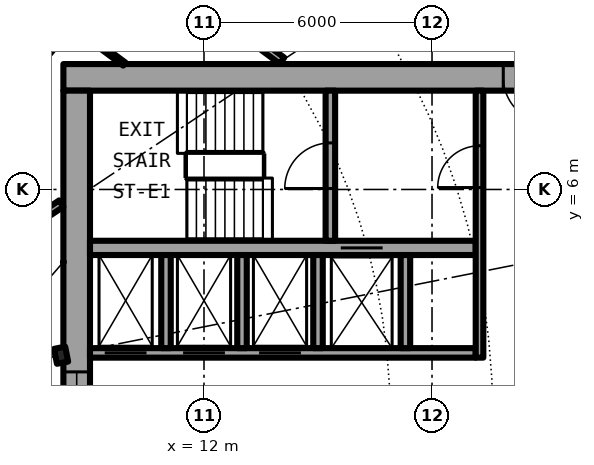
"""IFC4 building model, lengths in metres.
Left out: names, types, materials, properties, quantities, classifications, styles, units other than length and angle.
Written with IfcOpenShell. Run it as: python <this file> out.ifc"""

import sys

from ifc_helpers import new_model, si_unit, direction, frame, frame_2d, origin, origin_2d, place, context, subcontext, project, spatial, rectangle, i_section, extrude, element, fill, save


model = new_model("IFC4")
c1 = context("Model", 3, precision=1e-05, world=origin(), true_north=direction((0.0, 1.0)))
c2 = subcontext(c1, "Body", "Model", "MODEL_VIEW")
j1 = project(units=[si_unit("LENGTHUNIT", "METRE"), si_unit("PLANEANGLEUNIT", "RADIAN")], contexts=[c1])
p1 = place(None, origin())
s1 = spatial("IfcSite", under=j1, at=p1, CompositionType="ELEMENT")
p2 = place(p1, origin())
s2 = spatial("IfcBuilding", under=s1, at=p2, CompositionType="ELEMENT")
p3 = place(p2, frame((0.0, 0.0, 72.75)))
s3 = spatial("IfcBuildingStorey", under=s2, at=p3, CompositionType="ELEMENT", Elevation=72.75)
p4 = place(p3, frame((8.239, 1.639, 0.0), z_axis=(0.0, 0.0, 1.0), x_axis=(0.980785280403, 0.195090322016, 0.0)))
e1 = element("IfcColumn", 1, at=p4, inside=s3, PredefinedType="COLUMN", context=c2, shape_type="SweptSolid", body=[
    extrude(i_section(OverallWidth=0.3, OverallDepth=0.4, WebThickness=0.013, FlangeThickness=0.024, FilletRadius=0.027, at=origin_2d()), origin(), (0.0, 0.0, 1.0), 3.05),
])
p5 = place(p3, frame((22.3, 8.95, 0.0), z_axis=(0.0, 0.0, 1.0), x_axis=(-1.0, 0.0, 0.0)))
e2 = element("IfcWall", 2, at=p5, inside=s3, PredefinedType="SHEAR", context=c2, shape_type="SweptSolid", body=[
    extrude(rectangle(XDim=14.0, YDim=0.7, at=frame_2d((7.0, 0.0))), origin(), (0.0, 0.0, 1.0), 3.05),
])
p6 = place(p5, frame((1.225, 0.0, 0.0)))
e3 = element("IfcOpeningElement", 3, at=p6, cuts=e2, PredefinedType="OPENING", context=c2, shape_type="SweptSolid", body=[
    extrude(rectangle(XDim=1.2, YDim=2.3, at=frame_2d((0.6, 1.15))), frame((0.0, 0.36, 0.0), z_axis=(0.0, -1.0, 0.0), x_axis=(1.0, 0.0, 0.0)), (0.0, 0.0, 1.0), 0.72),
])
p7 = place(p3, frame((8.65, -8.6, 0.0), z_axis=(0.0, 0.0, 1.0), x_axis=(0.0, 1.0, 0.0)))
e4 = element("IfcWall", 4, at=p7, inside=s3, PredefinedType="SHEAR", context=c2, shape_type="SweptSolid", body=[
    extrude(rectangle(XDim=17.2, YDim=0.7, at=frame_2d((8.6, 0.0))), origin(), (0.0, 0.0, 1.0), 3.05),
])
p8 = place(p7, frame((7.4, 0.0, 0.1)))
e5 = element("IfcOpeningElement", 5, at=p8, cuts=e4, PredefinedType="OPENING", context=c2, shape_type="SweptSolid", body=[
    extrude(rectangle(XDim=2.4, YDim=2.2, at=frame_2d((1.2, 1.1))), frame((0.0, 0.36, 0.0), z_axis=(0.0, -1.0, 0.0), x_axis=(1.0, 0.0, 0.0)), (0.0, 0.0, 1.0), 0.72),
])
p9 = place(p3, frame((9.0, 1.7, 0.0), z_axis=(0.0, 0.0, 1.0), x_axis=(1.0, 0.0, 0.0)))
e6 = element("IfcWall", 6, at=p9, inside=s3, PredefinedType="SHEAR", context=c2, shape_type="SweptSolid", body=[
    extrude(rectangle(XDim=10.15, YDim=0.25, at=frame_2d((5.075, 0.0))), origin(), (0.0, 0.0, 1.0), 3.05),
])
p10 = place(p9, frame((0.387, 0.0, 0.0)))
e7 = element("IfcOpeningElement", 7, at=p10, cuts=e6, PredefinedType="OPENING", context=c2, shape_type="SweptSolid", body=[
    extrude(rectangle(XDim=1.1, YDim=2.3, at=frame_2d((0.55, 1.15))), frame((0.0, 0.135, 0.0), z_axis=(0.0, -1.0, 0.0), x_axis=(1.0, 0.0, 0.0)), (0.0, 0.0, 1.0), 0.27),
])
p11 = place(p9, frame((2.45, 0.0, 0.0)))
e8 = element("IfcOpeningElement", 8, at=p11, cuts=e6, PredefinedType="OPENING", context=c2, shape_type="SweptSolid", body=[
    extrude(rectangle(XDim=1.1, YDim=2.3, at=frame_2d((0.55, 1.15))), frame((0.0, 0.135, 0.0), z_axis=(0.0, -1.0, 0.0), x_axis=(1.0, 0.0, 0.0)), (0.0, 0.0, 1.0), 0.27),
])
p12 = place(p9, frame((4.45, 0.0, 0.0)))
e9 = element("IfcOpeningElement", 9, at=p12, cuts=e6, PredefinedType="OPENING", context=c2, shape_type="SweptSolid", body=[
    extrude(rectangle(XDim=1.1, YDim=2.3, at=frame_2d((0.55, 1.15))), frame((0.0, 0.135, 0.0), z_axis=(0.0, -1.0, 0.0), x_axis=(1.0, 0.0, 0.0)), (0.0, 0.0, 1.0), 0.27),
])
p13 = place(p3, frame((9.0, 4.462, 0.0), z_axis=(0.0, 0.0, 1.0), x_axis=(1.0, 0.0, 0.0)))
e10 = element("IfcWall", 10, at=p13, inside=s3, PredefinedType="SHEAR", context=c2, shape_type="SweptSolid", body=[
    extrude(rectangle(XDim=10.15, YDim=0.375, at=frame_2d((5.075, 0.0))), origin(), (0.0, 0.0, 1.0), 3.05),
])
p14 = place(p13, frame((6.6, 0.0, 0.0)))
e11 = element("IfcOpeningElement", 11, at=p14, cuts=e10, PredefinedType="OPENING", context=c2, shape_type="SweptSolid", body=[
    extrude(rectangle(XDim=1.1, YDim=2.3, at=frame_2d((0.55, 1.15))), frame((0.0, 0.198, 0.0), z_axis=(0.0, -1.0, 0.0), x_axis=(1.0, 0.0, 0.0)), (0.0, 0.0, 1.0), 0.395),
])
p15 = place(p3, frame((15.325, 4.65, 0.0), z_axis=(0.0, 0.0, 1.0), x_axis=(0.0, 1.0, 0.0)))
e12 = element("IfcWall", 12, at=p15, inside=s3, PredefinedType="SHEAR", context=c2, shape_type="SweptSolid", body=[
    extrude(rectangle(XDim=3.95, YDim=0.25, at=frame_2d((1.975, 0.0))), origin(), (0.0, 0.0, 1.0), 3.05),
])
p16 = place(p15, frame((1.375, 0.0, 0.0)))
e13 = element("IfcOpeningElement", 13, at=p16, cuts=e12, PredefinedType="OPENING", context=c2, shape_type="SweptSolid", body=[
    extrude(rectangle(XDim=1.2, YDim=2.3, at=frame_2d((0.6, 1.15))), frame((0.0, 0.135, 0.0), z_axis=(0.0, -1.0, 0.0), x_axis=(1.0, 0.0, 0.0)), (0.0, 0.0, 1.0), 0.27),
])
for number, where, z_axis, x_axis in (
    (14, (15.0, 1.825, 0.0), (0.0, 0.0, 1.0), (0.0, 1.0, 0.0)),
    (15, (17.3, 1.825, 0.0), (0.0, 0.0, 1.0), (0.0, 1.0, 0.0)),
):
    element("IfcWall", number, at=place(p3, frame(where, z_axis=z_axis, x_axis=x_axis)), inside=s3, PredefinedType="SOLIDWALL", context=c2, shape_type="SweptSolid", body=[
        extrude(rectangle(XDim=2.45, YDim=0.25, at=frame_2d((1.225, 0.0))), origin(), (0.0, 0.0, 1.0), 2.7),
    ])
p17 = place(p3, frame((19.25, 1.575, 0.0), z_axis=(0.0, 0.0, 1.0), x_axis=(0.0, 1.0, 0.0)))
e16 = element("IfcWall", 16, at=p17, inside=s3, PredefinedType="SOLIDWALL", context=c2, shape_type="SweptSolid", body=[
    extrude(rectangle(XDim=7.025, YDim=0.2, at=frame_2d((3.513, 0.0))), origin(), (0.0, 0.0, 1.0), 2.7),
])
p18 = place(p17, frame((4.475, 0.0, 0.0)))
e17 = element("IfcOpeningElement", 17, at=p18, cuts=e16, PredefinedType="OPENING", context=c2, shape_type="SweptSolid", body=[
    extrude(rectangle(XDim=1.1, YDim=2.3, at=frame_2d((0.55, 1.15))), frame((0.0, 0.11, 0.0), z_axis=(0.0, -1.0, 0.0), x_axis=(1.0, 0.0, 0.0)), (0.0, 0.0, 1.0), 0.22),
])
for number, where, z_axis, x_axis in (
    (18, (11.0, 1.825, 0.0), (0.0, 0.0, 1.0), (0.0, 1.0, 0.0)),
    (19, (13.0, 1.825, 0.0), (0.0, 0.0, 1.0), (0.0, 1.0, 0.0)),
):
    element("IfcWall", number, at=place(p3, frame(where, z_axis=z_axis, x_axis=x_axis)), inside=s3, PredefinedType="SOLIDWALL", context=c2, shape_type="SweptSolid", body=[
        extrude(rectangle(XDim=2.45, YDim=0.25, at=frame_2d((1.225, 0.0))), origin(), (0.0, 0.0, 1.0), 2.7),
    ])
p19 = place(p3, frame((4.909, 5.958, 0.0), z_axis=(0.0, 0.0, 1.0), x_axis=(0.635976043025, 0.771708800454, 0.0)))
e20 = element("IfcWall", 20, at=p19, inside=s3, PredefinedType="PARTITIONING", context=c2, shape_type="SweptSolid", body=[
    extrude(rectangle(XDim=8.213, YDim=0.1, at=frame_2d((4.106, 0.0))), origin(), (0.0, 0.0, 1.0), 2.7),
])
p20 = place(p19, frame((6.49, 0.0, 0.0)))
e21 = element("IfcOpeningElement", 21, at=p20, cuts=e20, PredefinedType="OPENING", context=c2, shape_type="SweptSolid", body=[
    extrude(rectangle(XDim=0.9, YDim=2.3, at=frame_2d((0.45, 1.15))), frame((0.0, 0.06, 0.0), z_axis=(0.0, -1.0, 0.0), x_axis=(1.0, 0.0, 0.0)), (0.0, 0.0, 1.0), 0.12),
])
p21 = place(p19, frame((2.384, 0.0, 0.0)))
e22 = element("IfcOpeningElement", 22, at=p21, cuts=e20, PredefinedType="OPENING", context=c2, shape_type="SweptSolid", body=[
    extrude(rectangle(XDim=0.9, YDim=2.3, at=frame_2d((0.45, 1.15))), frame((0.0, 0.06, 0.0), z_axis=(0.0, -1.0, 0.0), x_axis=(1.0, 0.0, 0.0)), (0.0, 0.0, 1.0), 0.12),
])
p22 = place(p3, frame((6.513, 4.472, 0.0), z_axis=(0.0, 0.0, 1.0), x_axis=(0.831382204863, 0.555701025225, 0.0)))
e23 = element("IfcWall", 23, at=p22, inside=s3, PredefinedType="PARTITIONING", context=c2, shape_type="SweptSolid", body=[
    extrude(rectangle(XDim=2.082, YDim=0.2, at=frame_2d((1.041, 0.0))), origin(), (0.0, 0.0, 1.0), 2.7),
])
p23 = place(p3, frame((8.512, 10.332, 0.0), z_axis=(0.0, 0.0, 1.0), x_axis=(0.803135014325, -0.595797070121, 0.0)))
e24 = element("IfcWall", 24, at=p23, inside=s3, PredefinedType="PARTITIONING", context=c2, shape_type="SweptSolid", body=[
    extrude(rectangle(XDim=1.732, YDim=0.1, at=frame_2d((0.866, 0.0))), origin(), (0.0, 0.0, 1.0), 2.7),
])
p24 = place(p3, frame((4.906, 16.172, 0.0), z_axis=(0.0, 0.0, 1.0), x_axis=(0.803204584823, -0.59570327758, 0.0)))
e25 = element("IfcWall", 25, at=p24, inside=s3, PredefinedType="PARTITIONING", context=c2, shape_type="SweptSolid", body=[
    extrude(rectangle(XDim=11.387, YDim=0.2, at=frame_2d((5.693, 0.0))), origin(), (0.0, 0.0, 1.0), 2.7),
])
p25 = place(p24, frame((4.38, 0.0, 0.0)))
e26 = element("IfcOpeningElement", 26, at=p25, cuts=e25, PredefinedType="OPENING", context=c2, shape_type="SweptSolid", body=[
    extrude(rectangle(XDim=1.0, YDim=2.3, at=frame_2d((0.5, 1.15))), frame((0.0, 0.11, 0.0), z_axis=(0.0, -1.0, 0.0), x_axis=(1.0, 0.0, 0.0)), (0.0, 0.0, 1.0), 0.22),
])
p26 = place(p10, origin())
e27 = element("IfcDoor", 27, at=p26, inside=s3, OperationType="DOUBLE_DOOR_SLIDING", PredefinedType="DOOR", context=c2, shape_type="SweptSolid", body=[
    extrude(rectangle(XDim=1.1, YDim=2.3, at=frame_2d((0.55, 1.15))), frame((0.0, 0.025, 0.0), z_axis=(0.0, -1.0, 0.0), x_axis=(1.0, 0.0, 0.0)), (0.0, 0.0, 1.0), 0.05),
])
fill(e7, e27)
p27 = place(p11, origin())
e28 = element("IfcDoor", 28, at=p27, inside=s3, OperationType="DOUBLE_DOOR_SLIDING", PredefinedType="DOOR", context=c2, shape_type="SweptSolid", body=[
    extrude(rectangle(XDim=1.1, YDim=2.3, at=frame_2d((0.55, 1.15))), frame((0.0, 0.025, 0.0), z_axis=(0.0, -1.0, 0.0), x_axis=(1.0, 0.0, 0.0)), (0.0, 0.0, 1.0), 0.05),
])
fill(e8, e28)
p28 = place(p12, origin())
e29 = element("IfcDoor", 29, at=p28, inside=s3, OperationType="DOUBLE_DOOR_SLIDING", PredefinedType="DOOR", context=c2, shape_type="SweptSolid", body=[
    extrude(rectangle(XDim=1.1, YDim=2.3, at=frame_2d((0.55, 1.15))), frame((0.0, 0.025, 0.0), z_axis=(0.0, -1.0, 0.0), x_axis=(1.0, 0.0, 0.0)), (0.0, 0.0, 1.0), 0.05),
])
fill(e9, e29)
p29 = place(p14, origin())
e30 = element("IfcDoor", 30, at=p29, inside=s3, OperationType="DOUBLE_DOOR_SLIDING", PredefinedType="DOOR", context=c2, shape_type="SweptSolid", body=[
    extrude(rectangle(XDim=1.1, YDim=2.3, at=frame_2d((0.55, 1.15))), frame((0.0, 0.025, 0.0), z_axis=(0.0, -1.0, 0.0), x_axis=(1.0, 0.0, 0.0)), (0.0, 0.0, 1.0), 0.05),
])
fill(e11, e30)
p30 = place(p16, origin())
e31 = element("IfcDoor", 31, at=p30, inside=s3, OperationType="SINGLE_SWING_LEFT", PredefinedType="DOOR", context=c2, shape_type="SweptSolid", body=[
    extrude(rectangle(XDim=1.2, YDim=2.3, at=frame_2d((0.6, 1.15))), frame((0.0, 0.025, 0.0), z_axis=(0.0, -1.0, 0.0), x_axis=(1.0, 0.0, 0.0)), (0.0, 0.0, 1.0), 0.05),
])
fill(e13, e31)
p31 = place(p18, origin())
e32 = element("IfcDoor", 32, at=p31, inside=s3, OperationType="SINGLE_SWING_LEFT", PredefinedType="DOOR", context=c2, shape_type="SweptSolid", body=[
    extrude(rectangle(XDim=1.1, YDim=2.3, at=frame_2d((0.55, 1.15))), frame((0.0, 0.025, 0.0), z_axis=(0.0, -1.0, 0.0), x_axis=(1.0, 0.0, 0.0)), (0.0, 0.0, 1.0), 0.05),
])
fill(e17, e32)
p32 = place(p6, origin())
e33 = element("IfcDoor", 33, at=p32, inside=s3, OperationType="SINGLE_SWING_RIGHT", PredefinedType="DOOR", context=c2, shape_type="SweptSolid", body=[
    extrude(rectangle(XDim=1.2, YDim=2.3, at=frame_2d((0.6, 1.15))), frame((0.0, 0.025, 0.0), z_axis=(0.0, -1.0, 0.0), x_axis=(1.0, 0.0, 0.0)), (0.0, 0.0, 1.0), 0.05),
])
fill(e3, e33)
p33 = place(p8, origin())
e34 = element("IfcWindow", 34, at=p33, inside=s3, PartitioningType="SINGLE_PANEL", PredefinedType="WINDOW", context=c2, shape_type="SweptSolid", body=[
    extrude(rectangle(XDim=2.4, YDim=2.2, at=frame_2d((1.2, 1.1))), frame((0.0, 0.03, 0.0), z_axis=(0.0, -1.0, 0.0), x_axis=(1.0, 0.0, 0.0)), (0.0, 0.0, 1.0), 0.06),
])
fill(e5, e34)
save(model, sys.argv[1])
